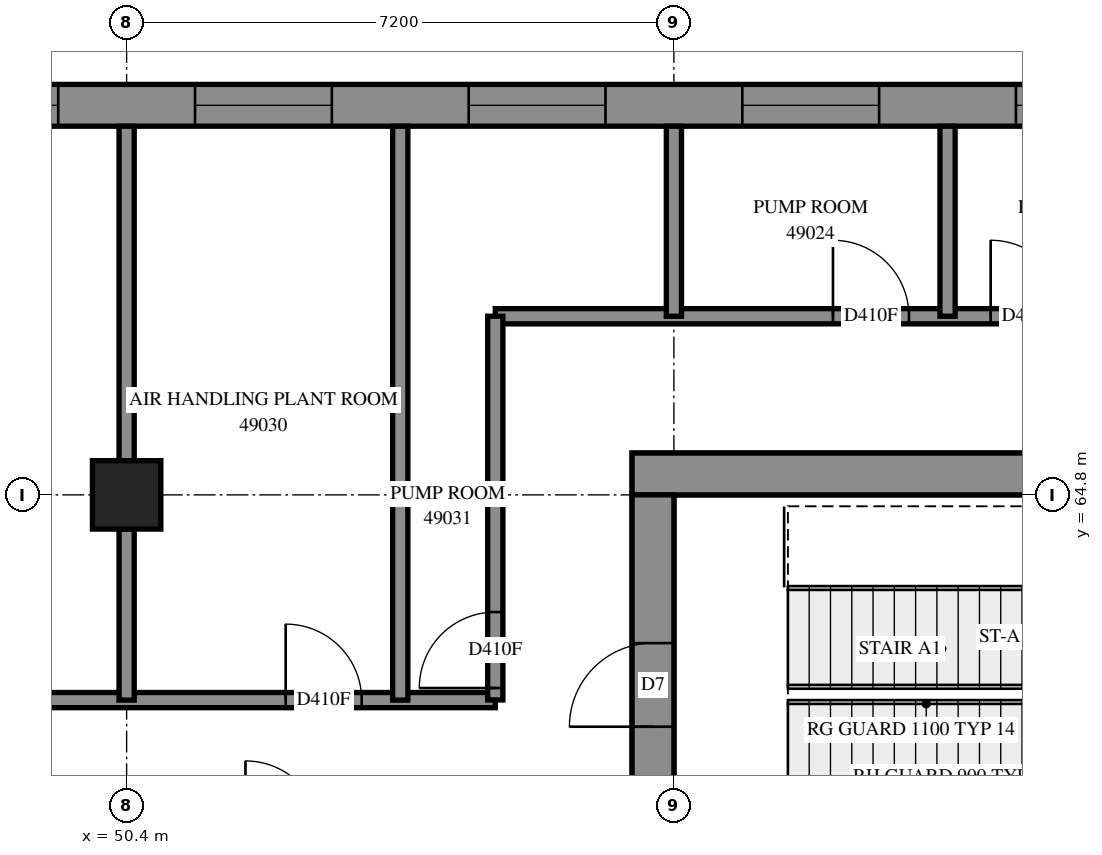
"""IFC4 building model, lengths in metres.
Left out: names, types, materials, properties, quantities, classifications, styles, units other than length and angle.
Written with IfcOpenShell. Run it as: python <this file> out.ifc"""

import sys

from ifc_helpers import new_model, si_unit, direction, frame, frame_2d, origin, origin_2d, place, context, subcontext, project, spatial, polyline, rectangle, outline, extrude, element, fill, save


model = new_model("IFC4")
c1 = context("Model", 3, precision=1e-05, world=origin(), true_north=direction((0.0, 1.0)))
c2 = subcontext(c1, "Body", "Model", "MODEL_VIEW")
j1 = project(units=[si_unit("LENGTHUNIT", "METRE"), si_unit("PLANEANGLEUNIT", "RADIAN")], contexts=[c1])
p1 = place(None, origin())
s1 = spatial("IfcSite", under=j1, at=p1, CompositionType="ELEMENT")
p2 = place(p1, origin())
s2 = spatial("IfcBuilding", under=s1, at=p2, CompositionType="ELEMENT")
p3 = place(p2, frame((0.0, 0.0, 180.4)))
s3 = spatial("IfcBuildingStorey", under=s2, at=p3, CompositionType="ELEMENT", Elevation=180.4)
p4 = place(p3, frame((50.4, 64.8, 0.0), z_axis=(0.0, 0.0, 1.0), x_axis=(1.0, 0.0, 0.0)))
e1 = element("IfcColumn", 1, at=p4, inside=s3, PredefinedType="COLUMN", context=c2, shape_type="SweptSolid", body=[
    extrude(rectangle(XDim=0.9, YDim=0.9, at=origin_2d()), origin(), (0.0, 0.0, 1.0), 4.7),
])
p5 = place(p3, frame((57.05, 65.075, -0.3), z_axis=(0.0, 0.0, 1.0), x_axis=(1.0, 0.0, 0.0)))
e2 = element("IfcWall", 2, at=p5, inside=s3, PredefinedType="SHEAR", context=c2, shape_type="SweptSolid", body=[
    extrude(rectangle(XDim=15.5, YDim=0.55, at=frame_2d((7.75, 0.0))), origin(), (0.0, 0.0, 1.0), 4.3),
])
p6 = place(p5, frame((10.55, 0.0, 0.3)))
e3 = element("IfcOpeningElement", 3, at=p6, cuts=e2, PredefinedType="OPENING", context=c2, shape_type="SweptSolid", body=[
    extrude(rectangle(XDim=0.8, YDim=2.1, at=frame_2d((0.4, 1.05))), frame((0.0, 0.285, 0.0), z_axis=(0.0, -1.0, 0.0), x_axis=(1.0, 0.0, 0.0)), (0.0, 0.0, 1.0), 0.57),
])
p7 = place(p3, frame((57.325, 50.4, -0.3), z_axis=(0.0, 0.0, 1.0), x_axis=(0.0, 1.0, 0.0)))
e4 = element("IfcWall", 4, at=p7, inside=s3, PredefinedType="SHEAR", context=c2, shape_type="SweptSolid", body=[
    extrude(rectangle(XDim=14.4, YDim=0.55, at=frame_2d((7.2, 0.0))), origin(), (0.0, 0.0, 1.0), 4.3),
])
p8 = place(p7, frame((4.55, 0.0, 0.3)))
e5 = element("IfcOpeningElement", 5, at=p8, cuts=e4, PredefinedType="OPENING", context=c2, shape_type="SweptSolid", body=[
    extrude(rectangle(XDim=1.1, YDim=2.1, at=frame_2d((0.55, 1.05))), frame((0.0, 0.285, 0.0), z_axis=(0.0, -1.0, 0.0), x_axis=(1.0, 0.0, 0.0)), (0.0, 0.0, 1.0), 0.57),
])
p9 = place(p7, frame((11.35, 0.0, 0.3)))
e6 = element("IfcOpeningElement", 6, at=p9, cuts=e4, PredefinedType="OPENING", context=c2, shape_type="SweptSolid", body=[
    extrude(rectangle(XDim=1.1, YDim=2.1, at=frame_2d((0.55, 1.05))), frame((0.0, 0.285, 0.0), z_axis=(0.0, -1.0, 0.0), x_axis=(1.0, 0.0, 0.0)), (0.0, 0.0, 1.0), 0.57),
])
p10 = place(p3, frame((78.341, 69.925, 0.0), z_axis=(0.0, 0.0, 1.0), x_axis=(-1.0, 0.0, 0.0)))
e7 = element("IfcWall", 7, at=p10, inside=s3, PredefinedType="SOLIDWALL", context=c2, shape_type="SweptSolid", body=[
    extrude(outline(polyline([(-0.114, -0.275), (54.941, -0.275), (54.391, 0.275), (0.114, 0.275), (-0.114, -0.275)])), origin(), (0.0, 0.0, 1.0), 4.7),
])
p11 = place(p10, frame((0.627, 0.0, 0.9)))
e8 = element("IfcOpeningElement", 8, at=p11, cuts=e7, PredefinedType="OPENING", context=c2, shape_type="SweptSolid", body=[
    extrude(rectangle(XDim=1.8, YDim=3.6, at=frame_2d((0.9, 1.8))), frame((0.0, 0.285, 0.0), z_axis=(0.0, -1.0, 0.0), x_axis=(1.0, 0.0, 0.0)), (0.0, 0.0, 1.0), 0.57),
])
p12 = place(p10, frame((3.64, 0.0, 0.9)))
e9 = element("IfcOpeningElement", 9, at=p12, cuts=e7, PredefinedType="OPENING", context=c2, shape_type="SweptSolid", body=[
    extrude(rectangle(XDim=1.8, YDim=3.6, at=frame_2d((0.9, 1.8))), frame((0.0, 0.285, 0.0), z_axis=(0.0, -1.0, 0.0), x_axis=(1.0, 0.0, 0.0)), (0.0, 0.0, 1.0), 0.57),
])
p13 = place(p10, frame((7.24, 0.0, 0.9)))
e10 = element("IfcOpeningElement", 10, at=p13, cuts=e7, PredefinedType="OPENING", context=c2, shape_type="SweptSolid", body=[
    extrude(rectangle(XDim=1.8, YDim=3.6, at=frame_2d((0.9, 1.8))), frame((0.0, 0.285, 0.0), z_axis=(0.0, -1.0, 0.0), x_axis=(1.0, 0.0, 0.0)), (0.0, 0.0, 1.0), 0.57),
])
p14 = place(p10, frame((10.841, 0.0, 0.9)))
e11 = element("IfcOpeningElement", 11, at=p14, cuts=e7, PredefinedType="OPENING", context=c2, shape_type="SweptSolid", body=[
    extrude(rectangle(XDim=1.8, YDim=3.6, at=frame_2d((0.9, 1.8))), frame((0.0, 0.285, 0.0), z_axis=(0.0, -1.0, 0.0), x_axis=(1.0, 0.0, 0.0)), (0.0, 0.0, 1.0), 0.57),
])
p15 = place(p10, frame((14.441, 0.0, 0.9)))
e12 = element("IfcOpeningElement", 12, at=p15, cuts=e7, PredefinedType="OPENING", context=c2, shape_type="SweptSolid", body=[
    extrude(rectangle(XDim=1.8, YDim=3.6, at=frame_2d((0.9, 1.8))), frame((0.0, 0.285, 0.0), z_axis=(0.0, -1.0, 0.0), x_axis=(1.0, 0.0, 0.0)), (0.0, 0.0, 1.0), 0.57),
])
p16 = place(p10, frame((18.041, 0.0, 0.9)))
e13 = element("IfcOpeningElement", 13, at=p16, cuts=e7, PredefinedType="OPENING", context=c2, shape_type="SweptSolid", body=[
    extrude(rectangle(XDim=1.8, YDim=3.6, at=frame_2d((0.9, 1.8))), frame((0.0, 0.285, 0.0), z_axis=(0.0, -1.0, 0.0), x_axis=(1.0, 0.0, 0.0)), (0.0, 0.0, 1.0), 0.57),
])
p17 = place(p10, frame((21.64, 0.0, 0.9)))
e14 = element("IfcOpeningElement", 14, at=p17, cuts=e7, PredefinedType="OPENING", context=c2, shape_type="SweptSolid", body=[
    extrude(rectangle(XDim=1.8, YDim=3.6, at=frame_2d((0.9, 1.8))), frame((0.0, 0.285, 0.0), z_axis=(0.0, -1.0, 0.0), x_axis=(1.0, 0.0, 0.0)), (0.0, 0.0, 1.0), 0.57),
])
p18 = place(p10, frame((25.241, 0.0, 0.9)))
e15 = element("IfcOpeningElement", 15, at=p18, cuts=e7, PredefinedType="OPENING", context=c2, shape_type="SweptSolid", body=[
    extrude(rectangle(XDim=1.8, YDim=3.6, at=frame_2d((0.9, 1.8))), frame((0.0, 0.285, 0.0), z_axis=(0.0, -1.0, 0.0), x_axis=(1.0, 0.0, 0.0)), (0.0, 0.0, 1.0), 0.57),
])
p19 = place(p10, frame((28.84, 0.0, 0.9)))
e16 = element("IfcOpeningElement", 16, at=p19, cuts=e7, PredefinedType="OPENING", context=c2, shape_type="SweptSolid", body=[
    extrude(rectangle(XDim=1.8, YDim=3.6, at=frame_2d((0.9, 1.8))), frame((0.0, 0.285, 0.0), z_axis=(0.0, -1.0, 0.0), x_axis=(1.0, 0.0, 0.0)), (0.0, 0.0, 1.0), 0.57),
])
p20 = place(p10, frame((32.441, 0.0, 0.9)))
e17 = element("IfcOpeningElement", 17, at=p20, cuts=e7, PredefinedType="OPENING", context=c2, shape_type="SweptSolid", body=[
    extrude(rectangle(XDim=1.8, YDim=3.6, at=frame_2d((0.9, 1.8))), frame((0.0, 0.285, 0.0), z_axis=(0.0, -1.0, 0.0), x_axis=(1.0, 0.0, 0.0)), (0.0, 0.0, 1.0), 0.57),
])
p21 = place(p10, frame((36.041, 0.0, 0.9)))
e18 = element("IfcOpeningElement", 18, at=p21, cuts=e7, PredefinedType="OPENING", context=c2, shape_type="SweptSolid", body=[
    extrude(rectangle(XDim=1.8, YDim=3.6, at=frame_2d((0.9, 1.8))), frame((0.0, 0.285, 0.0), z_axis=(0.0, -1.0, 0.0), x_axis=(1.0, 0.0, 0.0)), (0.0, 0.0, 1.0), 0.57),
])
p22 = place(p10, frame((39.641, 0.0, 0.9)))
e19 = element("IfcOpeningElement", 19, at=p22, cuts=e7, PredefinedType="OPENING", context=c2, shape_type="SweptSolid", body=[
    extrude(rectangle(XDim=1.8, YDim=3.6, at=frame_2d((0.9, 1.8))), frame((0.0, 0.285, 0.0), z_axis=(0.0, -1.0, 0.0), x_axis=(1.0, 0.0, 0.0)), (0.0, 0.0, 1.0), 0.57),
])
p23 = place(p10, frame((43.24, 0.0, 0.9)))
e20 = element("IfcOpeningElement", 20, at=p23, cuts=e7, PredefinedType="OPENING", context=c2, shape_type="SweptSolid", body=[
    extrude(rectangle(XDim=1.8, YDim=3.6, at=frame_2d((0.9, 1.8))), frame((0.0, 0.285, 0.0), z_axis=(0.0, -1.0, 0.0), x_axis=(1.0, 0.0, 0.0)), (0.0, 0.0, 1.0), 0.57),
])
p24 = place(p10, frame((46.84, 0.0, 0.9)))
e21 = element("IfcOpeningElement", 21, at=p24, cuts=e7, PredefinedType="OPENING", context=c2, shape_type="SweptSolid", body=[
    extrude(rectangle(XDim=1.8, YDim=3.6, at=frame_2d((0.9, 1.8))), frame((0.0, 0.285, 0.0), z_axis=(0.0, -1.0, 0.0), x_axis=(1.0, 0.0, 0.0)), (0.0, 0.0, 1.0), 0.57),
])
p25 = place(p10, frame((50.441, 0.0, 0.9)))
e22 = element("IfcOpeningElement", 22, at=p25, cuts=e7, PredefinedType="OPENING", context=c2, shape_type="SweptSolid", body=[
    extrude(rectangle(XDim=1.8, YDim=3.6, at=frame_2d((0.9, 1.8))), frame((0.0, 0.285, 0.0), z_axis=(0.0, -1.0, 0.0), x_axis=(1.0, 0.0, 0.0)), (0.0, 0.0, 1.0), 0.57),
])
p26 = place(p3, frame((55.25, 67.15, 0.0), z_axis=(0.0, 0.0, 1.0), x_axis=(1.0, 0.0, 0.0)))
e23 = element("IfcWall", 23, at=p26, inside=s3, PredefinedType="PARTITIONING", context=c2, shape_type="SweptSolid", body=[
    extrude(rectangle(XDim=19.1, YDim=0.2, at=frame_2d((9.55, 0.0))), origin(), (0.0, 0.0, 1.0), 4.7),
])
p27 = place(p26, frame((4.442, 0.0, 0.0)))
e24 = element("IfcOpeningElement", 24, at=p27, cuts=e23, PredefinedType="OPENING", context=c2, shape_type="SweptSolid", body=[
    extrude(rectangle(XDim=1.0, YDim=2.1, at=frame_2d((0.5, 1.05))), frame((0.0, 0.11, 0.0), z_axis=(0.0, -1.0, 0.0), x_axis=(1.0, 0.0, 0.0)), (0.0, 0.0, 1.0), 0.22),
])
p28 = place(p26, frame((6.518, 0.0, 0.0)))
e25 = element("IfcOpeningElement", 25, at=p28, cuts=e23, PredefinedType="OPENING", context=c2, shape_type="SweptSolid", body=[
    extrude(rectangle(XDim=1.0, YDim=2.1, at=frame_2d((0.5, 1.05))), frame((0.0, 0.11, 0.0), z_axis=(0.0, -1.0, 0.0), x_axis=(1.0, 0.0, 0.0)), (0.0, 0.0, 1.0), 0.22),
])
p29 = place(p26, frame((11.643, 0.0, 0.0)))
e26 = element("IfcOpeningElement", 26, at=p29, cuts=e23, PredefinedType="OPENING", context=c2, shape_type="SweptSolid", body=[
    extrude(rectangle(XDim=1.0, YDim=2.1, at=frame_2d((0.5, 1.05))), frame((0.0, 0.11, 0.0), z_axis=(0.0, -1.0, 0.0), x_axis=(1.0, 0.0, 0.0)), (0.0, 0.0, 1.0), 0.22),
])
p30 = place(p26, frame((13.717, 0.0, 0.0)))
e27 = element("IfcOpeningElement", 27, at=p30, cuts=e23, PredefinedType="OPENING", context=c2, shape_type="SweptSolid", body=[
    extrude(rectangle(XDim=1.0, YDim=2.1, at=frame_2d((0.5, 1.05))), frame((0.0, 0.11, 0.0), z_axis=(0.0, -1.0, 0.0), x_axis=(1.0, 0.0, 0.0)), (0.0, 0.0, 1.0), 0.22),
])
p31 = place(p3, frame((40.502, 62.1, 0.0), z_axis=(0.0, 0.0, 1.0), x_axis=(1.0, 0.0, 0.0)))
e28 = element("IfcWall", 28, at=p31, inside=s3, PredefinedType="PARTITIONING", context=c2, shape_type="SweptSolid", body=[
    extrude(rectangle(XDim=14.748, YDim=0.2, at=frame_2d((7.374, 0.0))), origin(), (0.0, 0.0, 1.0), 4.7),
])
p32 = place(p31, frame((0.265, 0.0, 0.0)))
e29 = element("IfcOpeningElement", 29, at=p32, cuts=e28, PredefinedType="OPENING", context=c2, shape_type="SweptSolid", body=[
    extrude(rectangle(XDim=1.0, YDim=2.1, at=frame_2d((0.5, 1.05))), frame((0.0, 0.11, 0.0), z_axis=(0.0, -1.0, 0.0), x_axis=(1.0, 0.0, 0.0)), (0.0, 0.0, 1.0), 0.22),
])
p33 = place(p31, frame((6.561, 0.0, 0.0)))
e30 = element("IfcOpeningElement", 30, at=p33, cuts=e28, PredefinedType="OPENING", context=c2, shape_type="SweptSolid", body=[
    extrude(rectangle(XDim=1.0, YDim=2.1, at=frame_2d((0.5, 1.05))), frame((0.0, 0.11, 0.0), z_axis=(0.0, -1.0, 0.0), x_axis=(1.0, 0.0, 0.0)), (0.0, 0.0, 1.0), 0.22),
])
p34 = place(p31, frame((11.991, 0.0, 0.0)))
e31 = element("IfcOpeningElement", 31, at=p34, cuts=e28, PredefinedType="OPENING", context=c2, shape_type="SweptSolid", body=[
    extrude(rectangle(XDim=1.0, YDim=2.1, at=frame_2d((0.5, 1.05))), frame((0.0, 0.11, 0.0), z_axis=(0.0, -1.0, 0.0), x_axis=(1.0, 0.0, 0.0)), (0.0, 0.0, 1.0), 0.22),
])
p35 = place(p3, frame((54.0, 62.1, 0.0), z_axis=(0.0, 0.0, 1.0), x_axis=(0.0, 1.0, 0.0)))
e32 = element("IfcWall", 32, at=p35, inside=s3, PredefinedType="PARTITIONING", context=c2, shape_type="SweptSolid", body=[
    extrude(rectangle(XDim=7.55, YDim=0.2, at=frame_2d((3.775, 0.0))), origin(), (0.0, 0.0, 1.0), 4.7),
])
p36 = place(p3, frame((55.25, 62.102, 0.0), z_axis=(0.0, 0.0, 1.0), x_axis=(0.0, 1.0, 0.0)))
e33 = element("IfcWall", 33, at=p36, inside=s3, PredefinedType="PARTITIONING", context=c2, shape_type="SweptSolid", body=[
    extrude(rectangle(XDim=5.048, YDim=0.2, at=frame_2d((2.524, 0.0))), origin(), (0.0, 0.0, 1.0), 4.7),
])
p37 = place(p36, frame((0.157, 0.0, 0.0)))
e34 = element("IfcOpeningElement", 34, at=p37, cuts=e33, PredefinedType="OPENING", context=c2, shape_type="SweptSolid", body=[
    extrude(rectangle(XDim=1.0, YDim=2.1, at=frame_2d((0.5, 1.05))), frame((0.0, 0.11, 0.0), z_axis=(0.0, -1.0, 0.0), x_axis=(1.0, 0.0, 0.0)), (0.0, 0.0, 1.0), 0.22),
])
p38 = place(p3, frame((50.4, 65.25, 0.0), z_axis=(0.0, 0.0, 1.0), x_axis=(0.0, 1.0, 0.0)))
e35 = element("IfcWall", 35, at=p38, inside=s3, PredefinedType="PARTITIONING", context=c2, shape_type="SweptSolid", body=[
    extrude(rectangle(XDim=4.4, YDim=0.2, at=frame_2d((2.2, 0.0))), origin(), (0.0, 0.0, 1.0), 4.7),
])
for number, where, z_axis, x_axis in (
    (36, (57.6, 67.15, 0.0), (0.0, 0.0, 1.0), (0.0, 1.0, 0.0)),
    (37, (61.2, 67.15, 0.0), (0.0, 0.0, 1.0), (0.0, 1.0, 0.0)),
):
    element("IfcWall", number, at=place(p3, frame(where, z_axis=z_axis, x_axis=x_axis)), inside=s3, PredefinedType="PARTITIONING", context=c2, shape_type="SweptSolid", body=[
        extrude(rectangle(XDim=2.5, YDim=0.2, at=frame_2d((1.25, 0.0))), origin(), (0.0, 0.0, 1.0), 4.7),
    ])
p39 = place(p3, frame((50.4, 62.1, 0.0), z_axis=(0.0, 0.0, 1.0), x_axis=(0.0, 1.0, 0.0)))
e38 = element("IfcWall", 38, at=p39, inside=s3, PredefinedType="PARTITIONING", context=c2, shape_type="SweptSolid", body=[
    extrude(rectangle(XDim=2.25, YDim=0.2, at=frame_2d((1.125, 0.0))), origin(), (0.0, 0.0, 1.0), 4.7),
])
p40 = place(p15, origin())
e39 = element("IfcWindow", 39, at=p40, inside=s3, PartitioningType="SINGLE_PANEL", PredefinedType="WINDOW", context=c2, shape_type="SweptSolid", body=[
    extrude(rectangle(XDim=1.8, YDim=3.6, at=frame_2d((0.9, 1.8))), frame((0.0, 0.155, 0.0), z_axis=(0.0, -1.0, 0.0), x_axis=(1.0, 0.0, 0.0)), (0.0, 0.0, 1.0), 0.06),
])
fill(e12, e39)
p41 = place(p16, origin())
e40 = element("IfcWindow", 40, at=p41, inside=s3, PartitioningType="SINGLE_PANEL", PredefinedType="WINDOW", context=c2, shape_type="SweptSolid", body=[
    extrude(rectangle(XDim=1.8, YDim=3.6, at=frame_2d((0.9, 1.8))), frame((0.0, 0.155, 0.0), z_axis=(0.0, -1.0, 0.0), x_axis=(1.0, 0.0, 0.0)), (0.0, 0.0, 1.0), 0.06),
])
fill(e13, e40)
p42 = place(p17, origin())
e41 = element("IfcWindow", 41, at=p42, inside=s3, PartitioningType="SINGLE_PANEL", PredefinedType="WINDOW", context=c2, shape_type="SweptSolid", body=[
    extrude(rectangle(XDim=1.8, YDim=3.6, at=frame_2d((0.9, 1.8))), frame((0.0, 0.155, 0.0), z_axis=(0.0, -1.0, 0.0), x_axis=(1.0, 0.0, 0.0)), (0.0, 0.0, 1.0), 0.06),
])
fill(e14, e41)
p43 = place(p18, origin())
e42 = element("IfcWindow", 42, at=p43, inside=s3, PartitioningType="SINGLE_PANEL", PredefinedType="WINDOW", context=c2, shape_type="SweptSolid", body=[
    extrude(rectangle(XDim=1.8, YDim=3.6, at=frame_2d((0.9, 1.8))), frame((0.0, 0.155, 0.0), z_axis=(0.0, -1.0, 0.0), x_axis=(1.0, 0.0, 0.0)), (0.0, 0.0, 1.0), 0.06),
])
fill(e15, e42)
p44 = place(p19, origin())
e43 = element("IfcWindow", 43, at=p44, inside=s3, PartitioningType="SINGLE_PANEL", PredefinedType="WINDOW", context=c2, shape_type="SweptSolid", body=[
    extrude(rectangle(XDim=1.8, YDim=3.6, at=frame_2d((0.9, 1.8))), frame((0.0, 0.155, 0.0), z_axis=(0.0, -1.0, 0.0), x_axis=(1.0, 0.0, 0.0)), (0.0, 0.0, 1.0), 0.06),
])
fill(e16, e43)
p45 = place(p9, origin())
e44 = element("IfcDoor", 44, at=p45, inside=s3, OperationType="SINGLE_SWING_LEFT", PredefinedType="DOOR", context=c2, shape_type="SweptSolid", body=[
    extrude(rectangle(XDim=1.1, YDim=2.1, at=frame_2d((0.55, 1.05))), frame((0.0, 0.025, 0.0), z_axis=(0.0, -1.0, 0.0), x_axis=(1.0, 0.0, 0.0)), (0.0, 0.0, 1.0), 0.05),
])
fill(e6, e44)
p46 = place(p27, origin())
e45 = element("IfcDoor", 45, at=p46, inside=s3, OperationType="SINGLE_SWING_RIGHT", PredefinedType="DOOR", context=c2, shape_type="SweptSolid", body=[
    extrude(rectangle(XDim=1.0, YDim=2.1, at=frame_2d((0.5, 1.05))), frame((0.0, 0.025, 0.0), z_axis=(0.0, -1.0, 0.0), x_axis=(1.0, 0.0, 0.0)), (0.0, 0.0, 1.0), 0.05),
])
fill(e24, e45)
p47 = place(p28, origin())
e46 = element("IfcDoor", 46, at=p47, inside=s3, OperationType="SINGLE_SWING_LEFT", PredefinedType="DOOR", context=c2, shape_type="SweptSolid", body=[
    extrude(rectangle(XDim=1.0, YDim=2.1, at=frame_2d((0.5, 1.05))), frame((0.0, 0.025, 0.0), z_axis=(0.0, -1.0, 0.0), x_axis=(1.0, 0.0, 0.0)), (0.0, 0.0, 1.0), 0.05),
])
fill(e25, e46)
p48 = place(p34, origin())
e47 = element("IfcDoor", 47, at=p48, inside=s3, OperationType="SINGLE_SWING_RIGHT", PredefinedType="DOOR", context=c2, shape_type="SweptSolid", body=[
    extrude(rectangle(XDim=1.0, YDim=2.1, at=frame_2d((0.5, 1.05))), frame((0.0, 0.025, 0.0), z_axis=(0.0, -1.0, 0.0), x_axis=(1.0, 0.0, 0.0)), (0.0, 0.0, 1.0), 0.05),
])
fill(e31, e47)
p49 = place(p37, origin())
e48 = element("IfcDoor", 48, at=p49, inside=s3, OperationType="SINGLE_SWING_LEFT", PredefinedType="DOOR", context=c2, shape_type="SweptSolid", body=[
    extrude(rectangle(XDim=1.0, YDim=2.1, at=frame_2d((0.5, 1.05))), frame((0.0, 0.025, 0.0), z_axis=(0.0, -1.0, 0.0), x_axis=(1.0, 0.0, 0.0)), (0.0, 0.0, 1.0), 0.05),
])
fill(e34, e48)
save(model, sys.argv[1])
